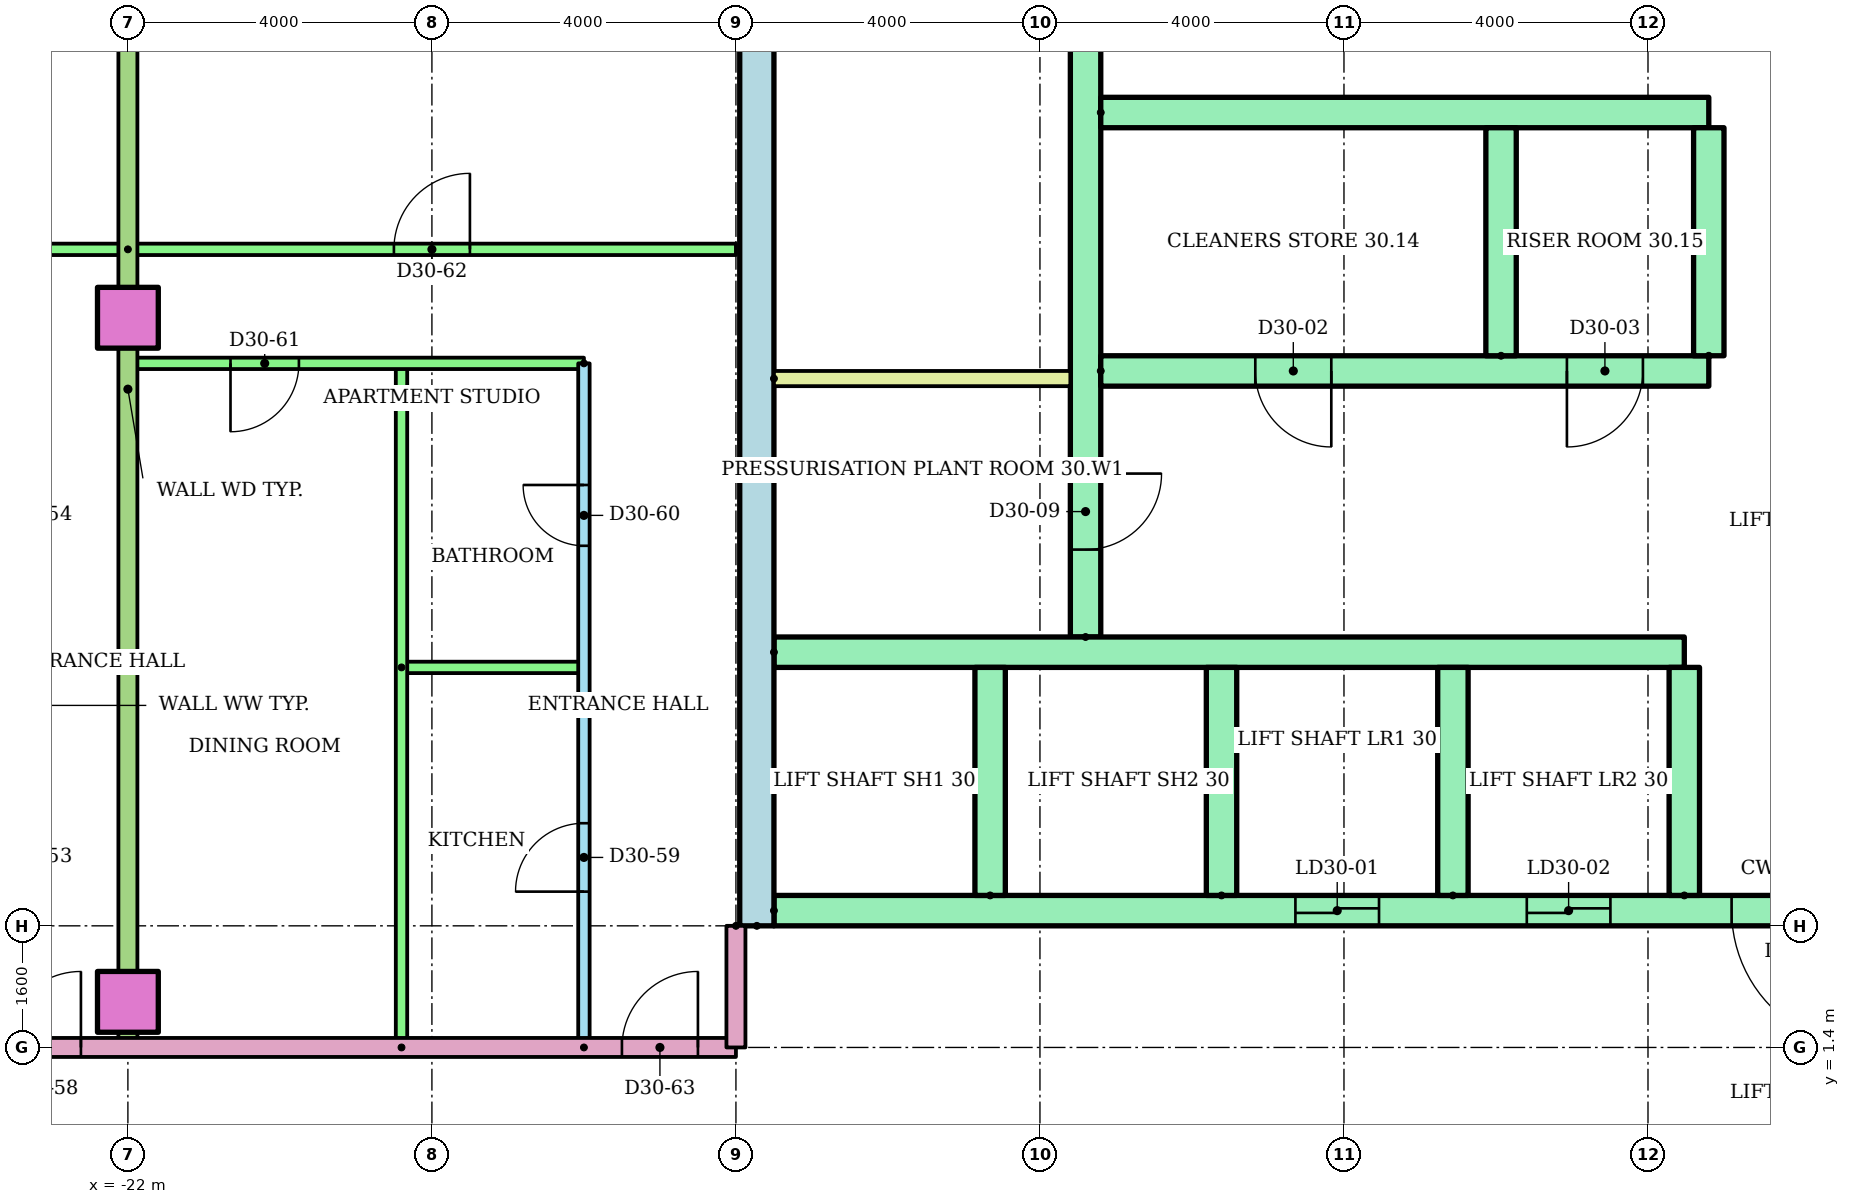
"""IFC4 building model, lengths in metres.
Left out: names, types, materials, properties, quantities, classifications, styles, units other than length and angle.
Written with IfcOpenShell. Run it as: python <this file> out.ifc"""

import sys

from ifc_helpers import new_model, si_unit, direction, frame, frame_2d, origin, origin_2d, place, context, subcontext, project, spatial, rectangle, extrude, element, fill, save


model = new_model("IFC4")
c1 = context("Model", 3, precision=1e-05, world=origin(), true_north=direction((0.0, 1.0)))
c2 = subcontext(c1, "Body", "Model", "MODEL_VIEW")
j1 = project(units=[si_unit("LENGTHUNIT", "METRE"), si_unit("PLANEANGLEUNIT", "RADIAN")], contexts=[c1])
p1 = place(None, origin())
s1 = spatial("IfcSite", under=j1, at=p1, CompositionType="ELEMENT")
p2 = place(p1, origin())
s2 = spatial("IfcBuilding", under=s1, at=p2, CompositionType="ELEMENT")
p3 = place(p2, frame((0.0, 0.0, 119.8)))
s3 = spatial("IfcBuildingStorey", under=s2, at=p3, CompositionType="ELEMENT", Elevation=119.8)
for number, where in (
    (1, (-22.0, 2.0, 0.0)),
    (2, (-22.0, 11.0, 0.0)),
):
    element("IfcColumn", number, at=place(p3, frame(where)), inside=s3, PredefinedType="COLUMN", context=c2, shape_type="SweptSolid", body=[
        extrude(rectangle(XDim=0.8, YDim=0.8, at=origin_2d()), origin(), (0.0, 0.0, 1.0), 3.2),
    ])
p4 = place(p3, frame((-13.725, 3.0, 0.0), z_axis=(0.0, 0.0, 1.0), x_axis=(0.0, 1.0, 0.0)))
e3 = element("IfcWall", 3, at=p4, inside=s3, PredefinedType="SHEAR", context=c2, shape_type="SweptSolid", body=[
    extrude(rectangle(XDim=17.0, YDim=0.45, at=frame_2d((8.5, 0.0))), origin(), (0.0, 0.0, 1.0), 2.92),
])
p5 = place(p3, frame((-9.4, 6.8, 0.0), z_axis=(0.0, 0.0, 1.0), x_axis=(0.0, 1.0, 0.0)))
e4 = element("IfcWall", 4, at=p5, inside=s3, PredefinedType="SHEAR", context=c2, shape_type="SweptSolid", body=[
    extrude(rectangle(XDim=12.7, YDim=0.4, at=frame_2d((6.35, 0.0))), origin(), (0.0, 0.0, 1.0), 2.92),
])
p6 = place(p5, frame((1.15, 0.0, 0.0)))
e5 = element("IfcOpeningElement", 5, at=p6, cuts=e4, PredefinedType="OPENING", context=c2, shape_type="SweptSolid", body=[
    extrude(rectangle(XDim=1.0, YDim=2.1, at=frame_2d((0.5, 1.05))), frame((0.0, 0.21, 0.0), z_axis=(0.0, -1.0, 0.0), x_axis=(1.0, 0.0, 0.0)), (0.0, 0.0, 1.0), 0.42),
])
p7 = place(p5, frame((7.925, 0.0, 0.0)))
e6 = element("IfcOpeningElement", 6, at=p7, cuts=e4, PredefinedType="OPENING", context=c2, shape_type="SweptSolid", body=[
    extrude(rectangle(XDim=1.0, YDim=2.1, at=frame_2d((0.5, 1.05))), frame((0.0, 0.21, 0.0), z_axis=(0.0, -1.0, 0.0), x_axis=(1.0, 0.0, 0.0)), (0.0, 0.0, 1.0), 0.42),
])
p8 = place(p3, frame((-13.5, 3.2, 0.0)))
e7 = element("IfcWall", 7, at=p8, inside=s3, PredefinedType="SHEAR", context=c2, shape_type="SweptSolid", body=[
    extrude(rectangle(XDim=27.0, YDim=0.4, at=frame_2d((13.5, 0.0))), origin(), (0.0, 0.0, 1.0), 2.92),
])
p9 = place(p8, frame((6.861, 0.0, 0.0)))
e8 = element("IfcOpeningElement", 8, at=p9, cuts=e7, PredefinedType="OPENING", context=c2, shape_type="SweptSolid", body=[
    extrude(rectangle(XDim=1.1, YDim=2.1, at=frame_2d((0.55, 1.05))), frame((0.0, 0.21, 0.0), z_axis=(0.0, -1.0, 0.0), x_axis=(1.0, 0.0, 0.0)), (0.0, 0.0, 1.0), 0.42),
])
p10 = place(p8, frame((9.906, 0.0, 0.0)))
e9 = element("IfcOpeningElement", 9, at=p10, cuts=e7, PredefinedType="OPENING", context=c2, shape_type="SweptSolid", body=[
    extrude(rectangle(XDim=1.1, YDim=2.1, at=frame_2d((0.55, 1.05))), frame((0.0, 0.21, 0.0), z_axis=(0.0, -1.0, 0.0), x_axis=(1.0, 0.0, 0.0)), (0.0, 0.0, 1.0), 0.42),
])
p11 = place(p8, frame((15.994, 0.0, 0.0)))
e10 = element("IfcOpeningElement", 10, at=p11, cuts=e7, PredefinedType="OPENING", context=c2, shape_type="SweptSolid", body=[
    extrude(rectangle(XDim=1.1, YDim=2.1, at=frame_2d((0.55, 1.05))), frame((0.0, 0.21, 0.0), z_axis=(0.0, -1.0, 0.0), x_axis=(1.0, 0.0, 0.0)), (0.0, 0.0, 1.0), 0.42),
])
p12 = place(p8, frame((19.039, 0.0, 0.0)))
e11 = element("IfcOpeningElement", 11, at=p12, cuts=e7, PredefinedType="OPENING", context=c2, shape_type="SweptSolid", body=[
    extrude(rectangle(XDim=1.1, YDim=2.1, at=frame_2d((0.55, 1.05))), frame((0.0, 0.21, 0.0), z_axis=(0.0, -1.0, 0.0), x_axis=(1.0, 0.0, 0.0)), (0.0, 0.0, 1.0), 0.42),
])
p13 = place(p8, frame((12.6, 0.0, 0.0)))
e12 = element("IfcOpeningElement", 12, at=p13, cuts=e7, PredefinedType="OPENING", context=c2, shape_type="SweptSolid", body=[
    extrude(rectangle(XDim=1.8, YDim=2.1, at=frame_2d((0.9, 1.05))), frame((0.0, 0.21, 0.0), z_axis=(0.0, -1.0, 0.0), x_axis=(1.0, 0.0, 0.0)), (0.0, 0.0, 1.0), 0.42),
])
p14 = place(p3, frame((-13.5, 6.6, 0.0)))
e13 = element("IfcWall", 13, at=p14, inside=s3, PredefinedType="SHEAR", context=c2, shape_type="SweptSolid", body=[
    extrude(rectangle(XDim=11.978, YDim=0.4, at=frame_2d((5.989, 0.0))), origin(), (0.0, 0.0, 1.0), 2.92),
])
for number, where, z_axis, x_axis in (
    (14, (-10.656, 3.4, 0.0), (0.0, 0.0, 1.0), (0.0, 1.0, 0.0)),
    (15, (-7.611, 3.4, 0.0), (0.0, 0.0, 1.0), (0.0, 1.0, 0.0)),
    (16, (-4.567, 3.4, 0.0), (0.0, 0.0, 1.0), (0.0, 1.0, 0.0)),
    (17, (-1.522, 3.4, 0.0), (0.0, 0.0, 1.0), (0.0, 1.0, 0.0)),
):
    element("IfcWall", number, at=place(p3, frame(where, z_axis=z_axis, x_axis=x_axis)), inside=s3, PredefinedType="SHEAR", context=c2, shape_type="SweptSolid", body=[
        extrude(rectangle(XDim=3.0, YDim=0.4, at=frame_2d((1.5, 0.0))), origin(), (0.0, 0.0, 1.0), 2.92),
    ])
p15 = place(p3, frame((-9.2, 10.3, 0.0)))
e18 = element("IfcWall", 18, at=p15, inside=s3, PredefinedType="SHEAR", context=c2, shape_type="SweptSolid", body=[
    extrude(rectangle(XDim=8.0, YDim=0.4, at=frame_2d((4.0, 0.0))), origin(), (0.0, 0.0, 1.0), 2.92),
])
p16 = place(p15, frame((2.033, 0.0, 0.0)))
e19 = element("IfcOpeningElement", 19, at=p16, cuts=e18, PredefinedType="OPENING", context=c2, shape_type="SweptSolid", body=[
    extrude(rectangle(XDim=1.0, YDim=2.1, at=frame_2d((0.5, 1.05))), frame((0.0, 0.21, 0.0), z_axis=(0.0, -1.0, 0.0), x_axis=(1.0, 0.0, 0.0)), (0.0, 0.0, 1.0), 0.42),
])
p17 = place(p15, frame((6.133, 0.0, 0.0)))
e20 = element("IfcOpeningElement", 20, at=p17, cuts=e18, PredefinedType="OPENING", context=c2, shape_type="SweptSolid", body=[
    extrude(rectangle(XDim=1.0, YDim=2.1, at=frame_2d((0.5, 1.05))), frame((0.0, 0.21, 0.0), z_axis=(0.0, -1.0, 0.0), x_axis=(1.0, 0.0, 0.0)), (0.0, 0.0, 1.0), 0.42),
])
p18 = place(p3, frame((-9.2, 13.7, 0.0)))
e21 = element("IfcWall", 21, at=p18, inside=s3, PredefinedType="SHEAR", context=c2, shape_type="SweptSolid", body=[
    extrude(rectangle(XDim=8.0, YDim=0.4, at=frame_2d((4.0, 0.0))), origin(), (0.0, 0.0, 1.0), 2.92),
])
for number, where, z_axis, x_axis in (
    (22, (-3.933, 10.5, 0.0), (0.0, 0.0, 1.0), (0.0, 1.0, 0.0)),
    (23, (-1.2, 10.5, 0.0), (0.0, 0.0, 1.0), (0.0, 1.0, 0.0)),
):
    element("IfcWall", number, at=place(p3, frame(where, z_axis=z_axis, x_axis=x_axis)), inside=s3, PredefinedType="SHEAR", context=c2, shape_type="SweptSolid", body=[
        extrude(rectangle(XDim=3.0, YDim=0.4, at=frame_2d((1.5, 0.0))), origin(), (0.0, 0.0, 1.0), 2.92),
    ])
p19 = place(p3, frame((-13.5, 10.2, 0.0)))
e24 = element("IfcWall", 24, at=p19, inside=s3, PredefinedType="PARTITIONING", context=c2, shape_type="SweptSolid", body=[
    extrude(rectangle(XDim=3.9, YDim=0.2, at=frame_2d((1.95, 0.0))), origin(), (0.0, 0.0, 1.0), 2.92),
])
p20 = place(p3, frame((-32.72, 11.9, 0.0)))
e25 = element("IfcWall", 25, at=p20, inside=s3, PredefinedType="PARTITIONING", context=c2, shape_type="SweptSolid", body=[
    extrude(rectangle(XDim=10.72, YDim=0.15, at=frame_2d((5.36, 0.0))), origin(), (0.0, 0.0, 1.0), 2.4),
])
p21 = place(p20, frame((1.102, 0.0, 0.0)))
e26 = element("IfcOpeningElement", 26, at=p21, cuts=e25, PredefinedType="OPENING", context=c2, shape_type="SweptSolid", body=[
    extrude(rectangle(XDim=1.0, YDim=2.1, at=frame_2d((0.5, 1.05))), frame((0.0, 0.085, 0.0), z_axis=(0.0, -1.0, 0.0), x_axis=(1.0, 0.0, 0.0)), (0.0, 0.0, 1.0), 0.17),
])
p22 = place(p20, frame((7.22, 0.0, 0.0)))
e27 = element("IfcOpeningElement", 27, at=p22, cuts=e25, PredefinedType="OPENING", context=c2, shape_type="SweptSolid", body=[
    extrude(rectangle(XDim=1.0, YDim=2.1, at=frame_2d((0.5, 1.05))), frame((0.0, 0.085, 0.0), z_axis=(0.0, -1.0, 0.0), x_axis=(1.0, 0.0, 0.0)), (0.0, 0.0, 1.0), 0.17),
])
p23 = place(p3, frame((-16.0, 1.4, 0.0), z_axis=(0.0, 0.0, 1.0), x_axis=(0.0, 1.0, 0.0)))
e28 = element("IfcWall", 28, at=p23, inside=s3, PredefinedType="PARTITIONING", context=c2, shape_type="SweptSolid", body=[
    extrude(rectangle(XDim=9.0, YDim=0.15, at=frame_2d((4.5, 0.0))), origin(), (0.0, 0.0, 1.0), 2.4),
])
p24 = place(p23, frame((2.05, 0.0, 0.0)))
e29 = element("IfcOpeningElement", 29, at=p24, cuts=e28, PredefinedType="OPENING", context=c2, shape_type="SweptSolid", body=[
    extrude(rectangle(XDim=0.9, YDim=2.1, at=frame_2d((0.45, 1.05))), frame((0.0, 0.085, 0.0), z_axis=(0.0, -1.0, 0.0), x_axis=(1.0, 0.0, 0.0)), (0.0, 0.0, 1.0), 0.17),
])
p25 = place(p23, frame((6.6, 0.0, 0.0)))
e30 = element("IfcOpeningElement", 30, at=p25, cuts=e28, PredefinedType="OPENING", context=c2, shape_type="SweptSolid", body=[
    extrude(rectangle(XDim=0.8, YDim=2.1, at=frame_2d((0.4, 1.05))), frame((0.0, 0.085, 0.0), z_axis=(0.0, -1.0, 0.0), x_axis=(1.0, 0.0, 0.0)), (0.0, 0.0, 1.0), 0.17),
])
p26 = place(p3, frame((-18.4, 6.4, 0.0)))
e31 = element("IfcWall", 31, at=p26, inside=s3, PredefinedType="PARTITIONING", context=c2, shape_type="SweptSolid", body=[
    extrude(rectangle(XDim=2.4, YDim=0.15, at=frame_2d((1.2, 0.0))), origin(), (0.0, 0.0, 1.0), 2.4),
])
p27 = place(p3, frame((-18.4, 1.4, 0.0), z_axis=(0.0, 0.0, 1.0), x_axis=(0.0, 1.0, 0.0)))
e32 = element("IfcWall", 32, at=p27, inside=s3, PredefinedType="PARTITIONING", context=c2, shape_type="SweptSolid", body=[
    extrude(rectangle(XDim=9.0, YDim=0.15, at=frame_2d((4.5, 0.0))), origin(), (0.0, 0.0, 1.0), 2.4),
])
p28 = place(p3, frame((-16.0, 10.4, 0.0), z_axis=(0.0, 0.0, 1.0), x_axis=(-1.0, 0.0, 0.0)))
e33 = element("IfcWall", 33, at=p28, inside=s3, PredefinedType="PARTITIONING", context=c2, shape_type="SweptSolid", body=[
    extrude(rectangle(XDim=6.0, YDim=0.15, at=frame_2d((3.0, 0.0))), origin(), (0.0, 0.0, 1.0), 2.4),
])
p29 = place(p28, frame((3.75, 0.0, 0.0)))
e34 = element("IfcOpeningElement", 34, at=p29, cuts=e33, PredefinedType="OPENING", context=c2, shape_type="SweptSolid", body=[
    extrude(rectangle(XDim=0.9, YDim=2.1, at=frame_2d((0.45, 1.05))), frame((0.0, 0.085, 0.0), z_axis=(0.0, -1.0, 0.0), x_axis=(1.0, 0.0, 0.0)), (0.0, 0.0, 1.0), 0.17),
])
p30 = place(p3, frame((-22.0, 11.9, 0.0)))
e35 = element("IfcWall", 35, at=p30, inside=s3, PredefinedType="PARTITIONING", context=c2, shape_type="SweptSolid", body=[
    extrude(rectangle(XDim=8.0, YDim=0.15, at=frame_2d((4.0, 0.0))), origin(), (0.0, 0.0, 1.0), 2.4),
])
p31 = place(p30, frame((3.5, 0.0, 0.0)))
e36 = element("IfcOpeningElement", 36, at=p31, cuts=e35, PredefinedType="OPENING", context=c2, shape_type="SweptSolid", body=[
    extrude(rectangle(XDim=1.0, YDim=2.1, at=frame_2d((0.5, 1.05))), frame((0.0, 0.085, 0.0), z_axis=(0.0, -1.0, 0.0), x_axis=(1.0, 0.0, 0.0)), (0.0, 0.0, 1.0), 0.17),
])
p32 = place(p3, frame((-22.0, 18.721, 0.0), z_axis=(0.0, 0.0, 1.0), x_axis=(0.0, -1.0, 0.0)))
e37 = element("IfcWall", 37, at=p32, inside=s3, PredefinedType="PARTITIONING", context=c2, shape_type="SweptSolid", body=[
    extrude(rectangle(XDim=17.321, YDim=0.25, at=frame_2d((8.661, 0.0))), origin(), (0.0, 0.0, 1.0), 2.4),
])
p33 = place(p3, frame((-29.0, 1.4, 0.0)))
e38 = element("IfcWall", 38, at=p33, inside=s3, PredefinedType="PARTITIONING", context=c2, shape_type="SweptSolid", body=[
    extrude(rectangle(XDim=15.0, YDim=0.25, at=frame_2d((7.5, 0.0))), origin(), (0.0, 0.0, 1.0), 2.4),
])
p34 = place(p33, frame((5.382, 0.0, 0.0)))
e39 = element("IfcOpeningElement", 39, at=p34, cuts=e38, PredefinedType="OPENING", context=c2, shape_type="SweptSolid", body=[
    extrude(rectangle(XDim=1.0, YDim=2.1, at=frame_2d((0.5, 1.05))), frame((0.0, 0.135, 0.0), z_axis=(0.0, -1.0, 0.0), x_axis=(1.0, 0.0, 0.0)), (0.0, 0.0, 1.0), 0.27),
])
p35 = place(p33, frame((13.5, 0.0, 0.0)))
e40 = element("IfcOpeningElement", 40, at=p35, cuts=e38, PredefinedType="OPENING", context=c2, shape_type="SweptSolid", body=[
    extrude(rectangle(XDim=1.0, YDim=2.1, at=frame_2d((0.5, 1.05))), frame((0.0, 0.135, 0.0), z_axis=(0.0, -1.0, 0.0), x_axis=(1.0, 0.0, 0.0)), (0.0, 0.0, 1.0), 0.27),
])
p36 = place(p3, frame((-14.0, 3.0, 0.0), z_axis=(0.0, 0.0, 1.0), x_axis=(0.0, -1.0, 0.0)))
e41 = element("IfcWall", 41, at=p36, inside=s3, PredefinedType="PARTITIONING", context=c2, shape_type="SweptSolid", body=[
    extrude(rectangle(XDim=1.6, YDim=0.25, at=frame_2d((0.8, 0.0))), origin(), (0.0, 0.0, 1.0), 2.4),
])
p37 = place(p9, origin())
e42 = element("IfcDoor", 42, at=p37, inside=s3, OperationType="SLIDING_TO_LEFT", PredefinedType="DOOR", context=c2, shape_type="SweptSolid", body=[
    extrude(rectangle(XDim=1.1, YDim=2.1, at=frame_2d((0.55, 1.05))), frame((0.0, 0.025, 0.0), z_axis=(0.0, -1.0, 0.0), x_axis=(1.0, 0.0, 0.0)), (0.0, 0.0, 1.0), 0.05),
])
fill(e8, e42)
p38 = place(p10, origin())
e43 = element("IfcDoor", 43, at=p38, inside=s3, OperationType="SLIDING_TO_LEFT", PredefinedType="DOOR", context=c2, shape_type="SweptSolid", body=[
    extrude(rectangle(XDim=1.1, YDim=2.1, at=frame_2d((0.55, 1.05))), frame((0.0, 0.025, 0.0), z_axis=(0.0, -1.0, 0.0), x_axis=(1.0, 0.0, 0.0)), (0.0, 0.0, 1.0), 0.05),
])
fill(e9, e43)
p39 = place(p13, frame((1.8, 0.0, 0.0), z_axis=(0.0, 0.0, 1.0), x_axis=(-1.0, 0.0, 0.0)))
e44 = element("IfcDoor", 44, at=p39, inside=s3, OperationType="DOUBLE_DOOR_SINGLE_SWING", PredefinedType="DOOR", context=c2, shape_type="SweptSolid", body=[
    extrude(rectangle(XDim=1.8, YDim=2.1, at=frame_2d((0.9, 1.05))), frame((0.0, 0.025, 0.0), z_axis=(0.0, -1.0, 0.0), x_axis=(1.0, 0.0, 0.0)), (0.0, 0.0, 1.0), 0.05),
])
fill(e12, e44)
p40 = place(p16, frame((1.0, 0.0, 0.0), z_axis=(0.0, 0.0, 1.0), x_axis=(-1.0, 0.0, 0.0)))
e45 = element("IfcDoor", 45, at=p40, inside=s3, OperationType="SINGLE_SWING_RIGHT", PredefinedType="DOOR", context=c2, shape_type="SweptSolid", body=[
    extrude(rectangle(XDim=1.0, YDim=2.1, at=frame_2d((0.5, 1.05))), frame((0.0, 0.025, 0.0), z_axis=(0.0, -1.0, 0.0), x_axis=(1.0, 0.0, 0.0)), (0.0, 0.0, 1.0), 0.05),
])
fill(e19, e45)
p41 = place(p17, frame((1.0, 0.0, 0.0), z_axis=(0.0, 0.0, 1.0), x_axis=(-1.0, 0.0, 0.0)))
e46 = element("IfcDoor", 46, at=p41, inside=s3, OperationType="SINGLE_SWING_LEFT", PredefinedType="DOOR", context=c2, shape_type="SweptSolid", body=[
    extrude(rectangle(XDim=1.0, YDim=2.1, at=frame_2d((0.5, 1.05))), frame((0.0, 0.025, 0.0), z_axis=(0.0, -1.0, 0.0), x_axis=(1.0, 0.0, 0.0)), (0.0, 0.0, 1.0), 0.05),
])
fill(e20, e46)
p42 = place(p6, frame((1.0, 0.0, 0.0), z_axis=(0.0, 0.0, 1.0), x_axis=(-1.0, 0.0, 0.0)))
e47 = element("IfcDoor", 47, at=p42, inside=s3, OperationType="SINGLE_SWING_RIGHT", PredefinedType="DOOR", context=c2, shape_type="SweptSolid", body=[
    extrude(rectangle(XDim=1.0, YDim=2.1, at=frame_2d((0.5, 1.05))), frame((0.0, 0.025, 0.0), z_axis=(0.0, -1.0, 0.0), x_axis=(1.0, 0.0, 0.0)), (0.0, 0.0, 1.0), 0.05),
])
fill(e5, e47)
p43 = place(p34, origin())
e48 = element("IfcDoor", 48, at=p43, inside=s3, OperationType="SINGLE_SWING_RIGHT", PredefinedType="DOOR", context=c2, shape_type="SweptSolid", body=[
    extrude(rectangle(XDim=1.0, YDim=2.1, at=frame_2d((0.5, 1.05))), frame((0.0, 0.025, 0.0), z_axis=(0.0, -1.0, 0.0), x_axis=(1.0, 0.0, 0.0)), (0.0, 0.0, 1.0), 0.05),
])
fill(e39, e48)
p44 = place(p24, origin())
e49 = element("IfcDoor", 49, at=p44, inside=s3, OperationType="SINGLE_SWING_LEFT", PredefinedType="DOOR", context=c2, shape_type="SweptSolid", body=[
    extrude(rectangle(XDim=0.9, YDim=2.1, at=frame_2d((0.45, 1.05))), frame((0.0, 0.025, 0.0), z_axis=(0.0, -1.0, 0.0), x_axis=(1.0, 0.0, 0.0)), (0.0, 0.0, 1.0), 0.05),
])
fill(e29, e49)
p45 = place(p25, origin())
e50 = element("IfcDoor", 50, at=p45, inside=s3, OperationType="SINGLE_SWING_RIGHT", PredefinedType="DOOR", context=c2, shape_type="SweptSolid", body=[
    extrude(rectangle(XDim=0.8, YDim=2.1, at=frame_2d((0.4, 1.05))), frame((0.0, 0.025, 0.0), z_axis=(0.0, -1.0, 0.0), x_axis=(1.0, 0.0, 0.0)), (0.0, 0.0, 1.0), 0.05),
])
fill(e30, e50)
p46 = place(p29, origin())
e51 = element("IfcDoor", 51, at=p46, inside=s3, OperationType="SINGLE_SWING_RIGHT", PredefinedType="DOOR", context=c2, shape_type="SweptSolid", body=[
    extrude(rectangle(XDim=0.9, YDim=2.1, at=frame_2d((0.45, 1.05))), frame((0.0, 0.025, 0.0), z_axis=(0.0, -1.0, 0.0), x_axis=(1.0, 0.0, 0.0)), (0.0, 0.0, 1.0), 0.05),
])
fill(e34, e51)
p47 = place(p31, origin())
e52 = element("IfcDoor", 52, at=p47, inside=s3, OperationType="SINGLE_SWING_RIGHT", PredefinedType="DOOR", context=c2, shape_type="SweptSolid", body=[
    extrude(rectangle(XDim=1.0, YDim=2.1, at=frame_2d((0.5, 1.05))), frame((0.0, 0.025, 0.0), z_axis=(0.0, -1.0, 0.0), x_axis=(1.0, 0.0, 0.0)), (0.0, 0.0, 1.0), 0.05),
])
fill(e36, e52)
p48 = place(p35, origin())
e53 = element("IfcDoor", 53, at=p48, inside=s3, OperationType="SINGLE_SWING_RIGHT", PredefinedType="DOOR", context=c2, shape_type="SweptSolid", body=[
    extrude(rectangle(XDim=1.0, YDim=2.1, at=frame_2d((0.5, 1.05))), frame((0.0, 0.025, 0.0), z_axis=(0.0, -1.0, 0.0), x_axis=(1.0, 0.0, 0.0)), (0.0, 0.0, 1.0), 0.05),
])
fill(e40, e53)
save(model, sys.argv[1])
